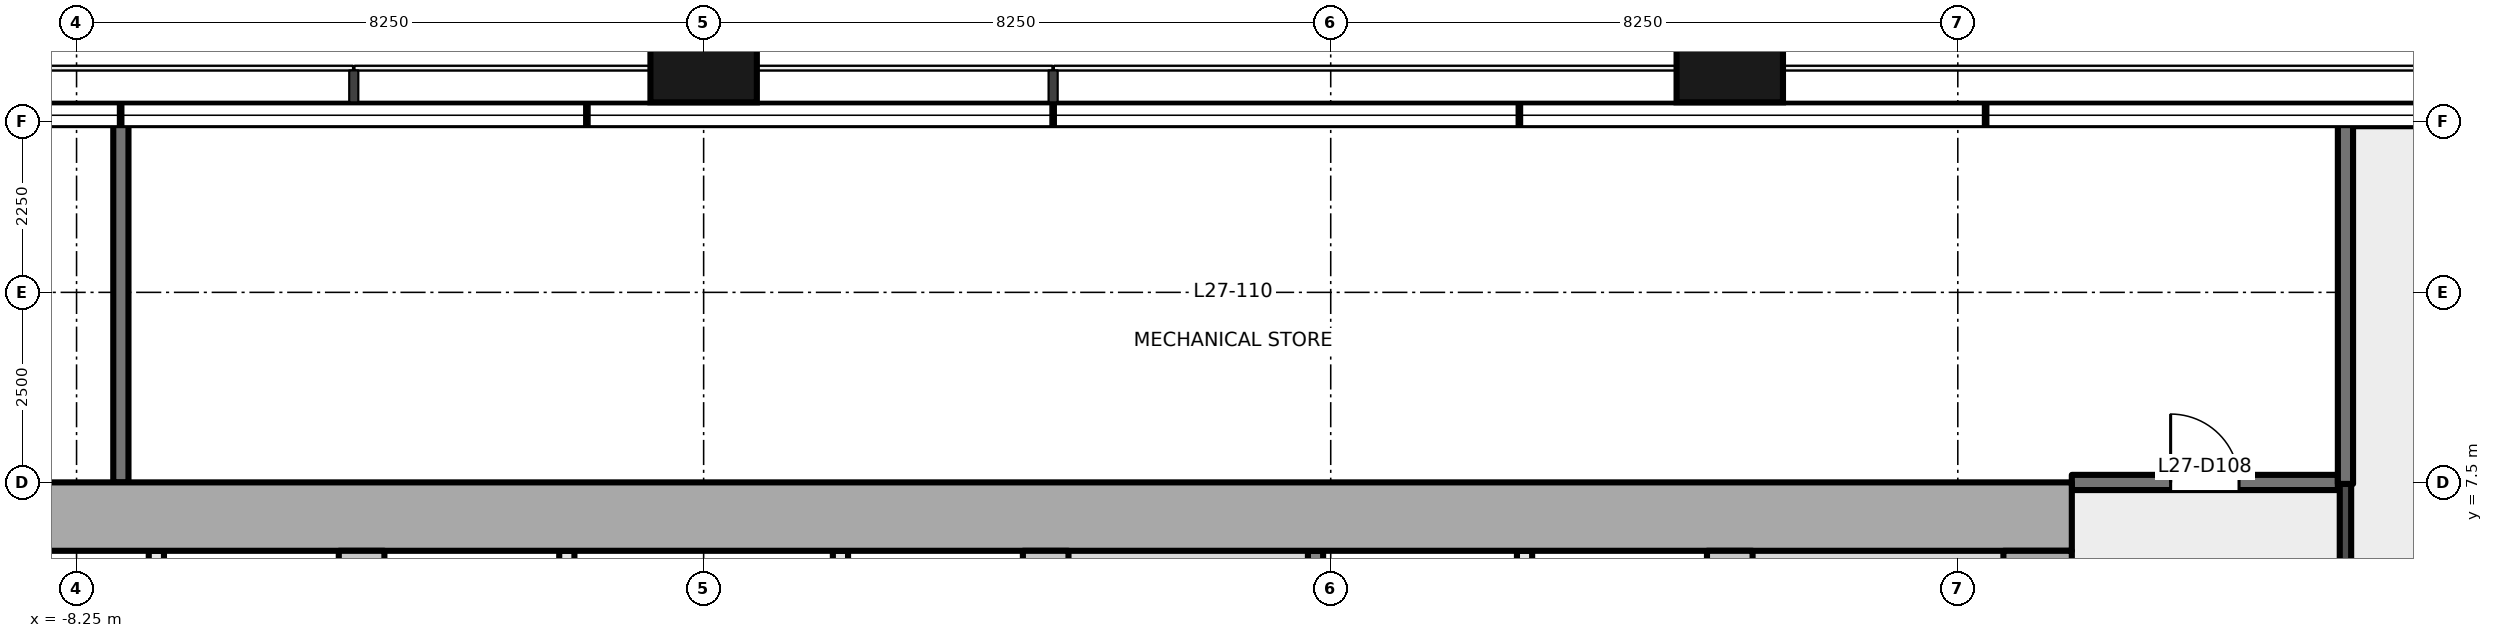
"""IFC4 building model, lengths in metres.
Left out: names, types, materials, properties, quantities, classifications, styles, units other than length and angle.
Written with IfcOpenShell. Run it as: python <this file> out.ifc"""

import sys

from ifc_helpers import new_model, si_unit, direction, frame, frame_2d, origin, origin_2d, place, context, subcontext, project, spatial, rectangle, extrude, element, fill, save


model = new_model("IFC4")
c1 = context("Model", 3, precision=1e-05, world=origin(), true_north=direction((0.0, 1.0)))
c2 = subcontext(c1, "Body", "Model", "MODEL_VIEW")
j1 = project(units=[si_unit("LENGTHUNIT", "METRE"), si_unit("PLANEANGLEUNIT", "RADIAN")], contexts=[c1])
p1 = place(None, origin())
s1 = spatial("IfcSite", under=j1, at=p1, CompositionType="ELEMENT")
p2 = place(p1, origin())
s2 = spatial("IfcBuilding", under=s1, at=p2, CompositionType="ELEMENT")
p3 = place(p2, frame((0.0, 0.0, 120.7)))
s3 = spatial("IfcBuildingStorey", under=s2, at=p3, CompositionType="ELEMENT", Elevation=120.7)
for number, where, z_axis, x_axis in (
    (1, (0.0, 13.4, -0.2), (0.0, 0.0, 1.0), (1.0, 0.0, 0.0)),
    (2, (13.5, 13.4, -0.2), (0.0, 0.0, 1.0), (1.0, 0.0, 0.0)),
):
    element("IfcColumn", number, at=place(p3, frame(where, z_axis=z_axis, x_axis=x_axis)), inside=s3, PredefinedType="COLUMN", context=c2, shape_type="SweptSolid", body=[
        extrude(rectangle(XDim=1.4, YDim=1.8, at=origin_2d()), origin(), (0.0, 0.0, 1.0), 5.4),
    ])
p4 = place(p3, frame((-18.0, 7.05, -0.2), z_axis=(0.0, 0.0, 1.0), x_axis=(1.0, 0.0, 0.0)))
e3 = element("IfcWall", 3, at=p4, inside=s3, PredefinedType="SHEAR", context=c2, shape_type="SweptSolid", body=[
    extrude(rectangle(XDim=36.0, YDim=0.9, at=frame_2d((18.0, 0.0))), origin(), (0.0, 0.0, 1.0), 5.4),
])
p5 = place(p3, frame((17.55, -6.6, -0.2), z_axis=(0.0, 0.0, 1.0), x_axis=(0.0, 1.0, 0.0)))
e4 = element("IfcWall", 4, at=p5, inside=s3, PredefinedType="SHEAR", context=c2, shape_type="SweptSolid", body=[
    extrude(rectangle(XDim=13.2, YDim=0.9, at=frame_2d((6.6, 0.0))), origin(), (0.0, 0.0, 1.0), 5.4),
])
p6 = place(p5, frame((4.55, 0.0, 0.2)))
e5 = element("IfcOpeningElement", 5, at=p6, cuts=e4, PredefinedType="OPENING", context=c2, shape_type="SweptSolid", body=[
    extrude(rectangle(XDim=1.2, YDim=2.1, at=frame_2d((0.6, 1.05))), frame((0.0, 0.46, 0.0), z_axis=(0.0, -1.0, 0.0), x_axis=(1.0, 0.0, 0.0)), (0.0, 0.0, 1.0), 0.921),
])
for number, where, z_axis, x_axis in (
    (6, (-4.5, -6.6, -0.2), (0.0, 0.0, 1.0), (0.0, 1.0, 0.0)),
    (7, (4.5, -6.6, -0.2), (0.0, 0.0, 1.0), (0.0, 1.0, 0.0)),
    (8, (13.5, -6.6, -0.2), (0.0, 0.0, 1.0), (0.0, 1.0, 0.0)),
):
    element("IfcWall", number, at=place(p3, frame(where, z_axis=z_axis, x_axis=x_axis)), inside=s3, PredefinedType="SHEAR", context=c2, shape_type="SweptSolid", body=[
        extrude(rectangle(XDim=13.2, YDim=0.6, at=frame_2d((6.6, 0.0))), origin(), (0.0, 0.0, 1.0), 5.4),
    ])
p7 = place(p3, frame((-7.2, -6.6, 0.0), z_axis=(0.0, 0.0, 1.0), x_axis=(0.0, 1.0, 0.0)))
e9 = element("IfcWall", 9, at=p7, inside=s3, PredefinedType="PARTITIONING", context=c2, shape_type="SweptSolid", body=[
    extrude(rectangle(XDim=13.2, YDim=0.2, at=frame_2d((6.6, 0.0))), origin(), (0.0, 0.0, 1.0), 5.2),
])
p8 = place(p7, frame((0.55, 0.0, 0.0)))
e10 = element("IfcOpeningElement", 10, at=p8, cuts=e9, PredefinedType="OPENING", context=c2, shape_type="SweptSolid", body=[
    extrude(rectangle(XDim=0.9, YDim=2.1, at=frame_2d((0.45, 1.05))), frame((0.0, 0.111, 0.0), z_axis=(0.0, -1.0, 0.0), x_axis=(1.0, 0.0, 0.0)), (0.0, 0.0, 1.0), 0.221),
])
p9 = place(p7, frame((2.9, 0.0, 0.0)))
e11 = element("IfcOpeningElement", 11, at=p9, cuts=e9, PredefinedType="OPENING", context=c2, shape_type="SweptSolid", body=[
    extrude(rectangle(XDim=1.2, YDim=2.1, at=frame_2d((0.6, 1.05))), frame((0.0, 0.111, 0.0), z_axis=(0.0, -1.0, 0.0), x_axis=(1.0, 0.0, 0.0)), (0.0, 0.0, 1.0), 0.221),
])
p10 = place(p7, frame((5.7, 0.0, 0.0)))
e12 = element("IfcOpeningElement", 12, at=p10, cuts=e9, PredefinedType="OPENING", context=c2, shape_type="SweptSolid", body=[
    extrude(rectangle(XDim=1.2, YDim=2.1, at=frame_2d((0.6, 1.05))), frame((0.0, 0.111, 0.0), z_axis=(0.0, -1.0, 0.0), x_axis=(1.0, 0.0, 0.0)), (0.0, 0.0, 1.0), 0.221),
])
p11 = place(p7, frame((8.5, 0.0, 0.0)))
e13 = element("IfcOpeningElement", 13, at=p11, cuts=e9, PredefinedType="OPENING", context=c2, shape_type="SweptSolid", body=[
    extrude(rectangle(XDim=1.2, YDim=2.1, at=frame_2d((0.6, 1.05))), frame((0.0, 0.111, 0.0), z_axis=(0.0, -1.0, 0.0), x_axis=(1.0, 0.0, 0.0)), (0.0, 0.0, 1.0), 0.221),
])
p12 = place(p7, frame((11.3, 0.0, 0.0)))
e14 = element("IfcOpeningElement", 14, at=p12, cuts=e9, PredefinedType="OPENING", context=c2, shape_type="SweptSolid", body=[
    extrude(rectangle(XDim=1.2, YDim=2.1, at=frame_2d((0.6, 1.05))), frame((0.0, 0.111, 0.0), z_axis=(0.0, -1.0, 0.0), x_axis=(1.0, 0.0, 0.0)), (0.0, 0.0, 1.0), 0.221),
])
p13 = place(p3, frame((-1.8, -6.6, 0.0), z_axis=(0.0, 0.0, 1.0), x_axis=(0.0, 1.0, 0.0)))
e15 = element("IfcWall", 15, at=p13, inside=s3, PredefinedType="PARTITIONING", context=c2, shape_type="SweptSolid", body=[
    extrude(rectangle(XDim=13.2, YDim=0.2, at=frame_2d((6.6, 0.0))), origin(), (0.0, 0.0, 1.0), 5.2),
])
p14 = place(p13, frame((0.55, 0.0, 0.0)))
e16 = element("IfcOpeningElement", 16, at=p14, cuts=e15, PredefinedType="OPENING", context=c2, shape_type="SweptSolid", body=[
    extrude(rectangle(XDim=0.9, YDim=2.1, at=frame_2d((0.45, 1.05))), frame((0.0, 0.111, 0.0), z_axis=(0.0, -1.0, 0.0), x_axis=(1.0, 0.0, 0.0)), (0.0, 0.0, 1.0), 0.221),
])
p15 = place(p3, frame((1.8, -6.6, 0.0), z_axis=(0.0, 0.0, 1.0), x_axis=(0.0, 1.0, 0.0)))
e17 = element("IfcWall", 17, at=p15, inside=s3, PredefinedType="PARTITIONING", context=c2, shape_type="SweptSolid", body=[
    extrude(rectangle(XDim=13.2, YDim=0.2, at=frame_2d((6.6, 0.0))), origin(), (0.0, 0.0, 1.0), 5.2),
])
p16 = place(p15, frame((0.55, 0.0, 0.0)))
e18 = element("IfcOpeningElement", 18, at=p16, cuts=e17, PredefinedType="OPENING", context=c2, shape_type="SweptSolid", body=[
    extrude(rectangle(XDim=0.9, YDim=2.1, at=frame_2d((0.45, 1.05))), frame((0.0, 0.111, 0.0), z_axis=(0.0, -1.0, 0.0), x_axis=(1.0, 0.0, 0.0)), (0.0, 0.0, 1.0), 0.221),
])
p17 = place(p3, frame((8.05, -6.6, 0.0), z_axis=(0.0, 0.0, 1.0), x_axis=(0.0, 1.0, 0.0)))
e19 = element("IfcWall", 19, at=p17, inside=s3, PredefinedType="PARTITIONING", context=c2, shape_type="SweptSolid", body=[
    extrude(rectangle(XDim=13.2, YDim=0.2, at=frame_2d((6.6, 0.0))), origin(), (0.0, 0.0, 1.0), 5.2),
])
p18 = place(p17, frame((0.502, 0.0, 0.0)))
e20 = element("IfcOpeningElement", 20, at=p18, cuts=e19, PredefinedType="OPENING", context=c2, shape_type="SweptSolid", body=[
    extrude(rectangle(XDim=0.9, YDim=2.1, at=frame_2d((0.45, 1.05))), frame((0.0, 0.111, 0.0), z_axis=(0.0, -1.0, 0.0), x_axis=(1.0, 0.0, 0.0)), (0.0, 0.0, 1.0), 0.221),
])
p19 = place(p17, frame((2.406, 0.0, 0.0)))
e21 = element("IfcOpeningElement", 21, at=p19, cuts=e19, PredefinedType="OPENING", context=c2, shape_type="SweptSolid", body=[
    extrude(rectangle(XDim=0.9, YDim=2.1, at=frame_2d((0.45, 1.05))), frame((0.0, 0.111, 0.0), z_axis=(0.0, -1.0, 0.0), x_axis=(1.0, 0.0, 0.0)), (0.0, 0.0, 1.0), 0.221),
])
p20 = place(p17, frame((4.854, 0.0, 0.0)))
e22 = element("IfcOpeningElement", 22, at=p20, cuts=e19, PredefinedType="OPENING", context=c2, shape_type="SweptSolid", body=[
    extrude(rectangle(XDim=0.9, YDim=2.1, at=frame_2d((0.45, 1.05))), frame((0.0, 0.111, 0.0), z_axis=(0.0, -1.0, 0.0), x_axis=(1.0, 0.0, 0.0)), (0.0, 0.0, 1.0), 0.221),
])
p21 = place(p17, frame((11.9, 0.0, 0.0)))
e23 = element("IfcOpeningElement", 23, at=p21, cuts=e19, PredefinedType="OPENING", context=c2, shape_type="SweptSolid", body=[
    extrude(rectangle(XDim=1.1, YDim=2.1, at=frame_2d((0.55, 1.05))), frame((0.0, 0.111, 0.0), z_axis=(0.0, -1.0, 0.0), x_axis=(1.0, 0.0, 0.0)), (0.0, 0.0, 1.0), 0.221),
])
p22 = place(p3, frame((10.8, -6.6, 0.0), z_axis=(0.0, 0.0, 1.0), x_axis=(0.0, 1.0, 0.0)))
e24 = element("IfcWall", 24, at=p22, inside=s3, PredefinedType="PARTITIONING", context=c2, shape_type="SweptSolid", body=[
    extrude(rectangle(XDim=13.2, YDim=0.2, at=frame_2d((6.6, 0.0))), origin(), (0.0, 0.0, 1.0), 5.2),
])
p23 = place(p22, frame((0.7, 0.0, 0.0)))
e25 = element("IfcOpeningElement", 25, at=p23, cuts=e24, PredefinedType="OPENING", context=c2, shape_type="SweptSolid", body=[
    extrude(rectangle(XDim=1.2, YDim=2.1, at=frame_2d((0.6, 1.05))), frame((0.0, 0.111, 0.0), z_axis=(0.0, -1.0, 0.0), x_axis=(1.0, 0.0, 0.0)), (0.0, 0.0, 1.0), 0.221),
])
p24 = place(p22, frame((8.478, 0.0, 0.0)))
e26 = element("IfcOpeningElement", 26, at=p24, cuts=e24, PredefinedType="OPENING", context=c2, shape_type="SweptSolid", body=[
    extrude(rectangle(XDim=0.9, YDim=2.1, at=frame_2d((0.45, 1.05))), frame((0.0, 0.111, 0.0), z_axis=(0.0, -1.0, 0.0), x_axis=(1.0, 0.0, 0.0)), (0.0, 0.0, 1.0), 0.221),
])
p25 = place(p22, frame((9.534, 0.0, 0.0)))
e27 = element("IfcOpeningElement", 27, at=p25, cuts=e24, PredefinedType="OPENING", context=c2, shape_type="SweptSolid", body=[
    extrude(rectangle(XDim=0.9, YDim=2.1, at=frame_2d((0.45, 1.05))), frame((0.0, 0.111, 0.0), z_axis=(0.0, -1.0, 0.0), x_axis=(1.0, 0.0, 0.0)), (0.0, 0.0, 1.0), 0.221),
])
p26 = place(p22, frame((11.406, 0.0, 0.0)))
e28 = element("IfcOpeningElement", 28, at=p26, cuts=e24, PredefinedType="OPENING", context=c2, shape_type="SweptSolid", body=[
    extrude(rectangle(XDim=0.9, YDim=2.1, at=frame_2d((0.45, 1.05))), frame((0.0, 0.111, 0.0), z_axis=(0.0, -1.0, 0.0), x_axis=(1.0, 0.0, 0.0)), (0.0, 0.0, 1.0), 0.221),
])
p27 = place(p3, frame((21.6, 7.48, 0.0), z_axis=(0.0, 0.0, 1.0), x_axis=(0.0, -1.0, 0.0)))
e29 = element("IfcWall", 29, at=p27, inside=s3, PredefinedType="PARTITIONING", context=c2, shape_type="SweptSolid", body=[
    extrude(rectangle(XDim=9.96, YDim=0.15, at=frame_2d((4.98, 0.0))), origin(), (0.0, 0.0, 1.0), 4.7),
])
p28 = place(p27, frame((6.67, 0.0, 0.0)))
e30 = element("IfcOpeningElement", 30, at=p28, cuts=e29, PredefinedType="OPENING", context=c2, shape_type="SweptSolid", body=[
    extrude(rectangle(XDim=0.9, YDim=2.1, at=frame_2d((0.45, 1.05))), frame((0.0, 0.085, 0.0), z_axis=(0.0, -1.0, 0.0), x_axis=(1.0, 0.0, 0.0)), (0.0, 0.0, 1.0), 0.171),
])
p29 = place(p3, frame((18.0, 7.499, 0.0), z_axis=(0.0, 0.0, 1.0), x_axis=(1.0, 0.0, 0.0)))
e31 = element("IfcWall", 31, at=p29, inside=s3, PredefinedType="PARTITIONING", context=c2, shape_type="SweptSolid", body=[
    extrude(rectangle(XDim=3.5, YDim=0.2, at=frame_2d((1.75, 0.0))), origin(), (0.0, 0.0, 1.0), 5.2),
])
p30 = place(p29, frame((1.3, 0.0, 0.0)))
e32 = element("IfcOpeningElement", 32, at=p30, cuts=e31, PredefinedType="OPENING", context=c2, shape_type="SweptSolid", body=[
    extrude(rectangle(XDim=0.9, YDim=2.1, at=frame_2d((0.45, 1.05))), frame((0.0, 0.111, 0.0), z_axis=(0.0, -1.0, 0.0), x_axis=(1.0, 0.0, 0.0)), (0.0, 0.0, 1.0), 0.221),
])
p31 = place(p3, frame((-7.667, 12.24, 0.0), z_axis=(0.0, 0.0, 1.0), x_axis=(0.0, -1.0, 0.0)))
e33 = element("IfcWall", 33, at=p31, inside=s3, PredefinedType="PARTITIONING", context=c2, shape_type="SweptSolid", body=[
    extrude(rectangle(XDim=4.74, YDim=0.2, at=frame_2d((2.37, 0.0))), origin(), (0.0, 0.0, 1.0), 5.2),
])
p32 = place(p3, frame((21.6, 7.48, 0.0), z_axis=(0.0, 0.0, 1.0), x_axis=(0.0, 1.0, 0.0)))
e34 = element("IfcWall", 34, at=p32, inside=s3, PredefinedType="PARTITIONING", context=c2, shape_type="SweptSolid", body=[
    extrude(rectangle(XDim=4.76, YDim=0.2, at=frame_2d((2.38, 0.0))), origin(), (0.0, 0.0, 1.0), 5.2),
])
p33 = place(p30, origin())
e35 = element("IfcDoor", 35, at=p33, inside=s3, OperationType="SINGLE_SWING_LEFT", PredefinedType="DOOR", context=c2, shape_type="SweptSolid", body=[
    extrude(rectangle(XDim=0.9, YDim=2.1, at=frame_2d((0.45, 1.05))), frame((0.0, 0.025, 0.0), z_axis=(0.0, -1.0, 0.0), x_axis=(1.0, 0.0, 0.0)), (0.0, 0.0, 1.0), 0.05),
])
fill(e32, e35)
save(model, sys.argv[1])
